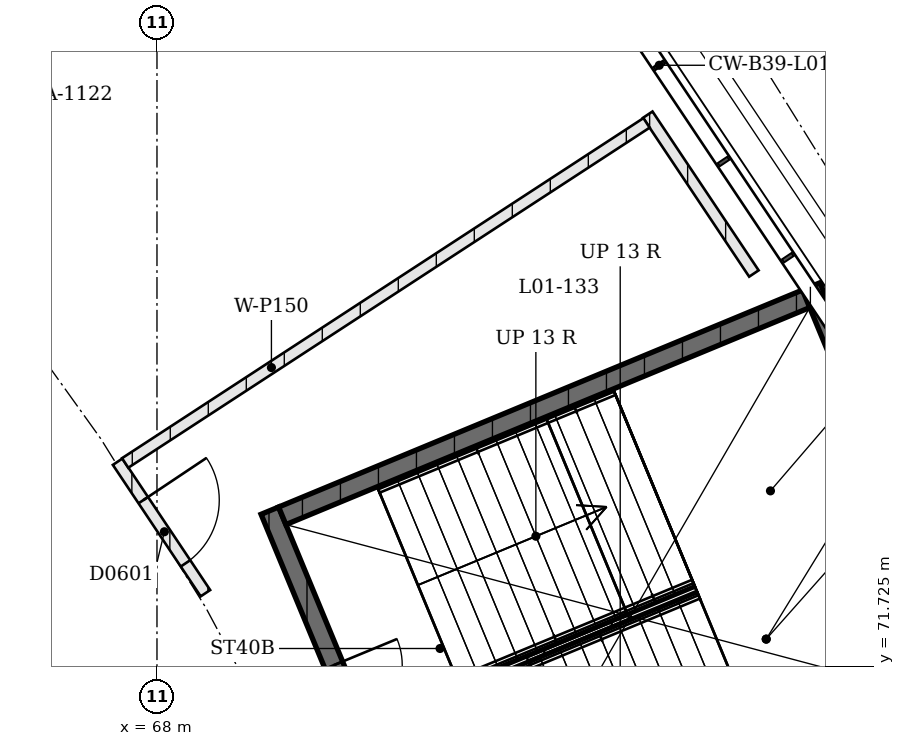
"""IFC4 building model, lengths in metres.
Left out: names, types, materials, properties, quantities, classifications, styles, units other than length and angle.
Written with IfcOpenShell. Run it as: python <this file> out.ifc"""

import sys

from ifc_helpers import new_model, si_unit, direction, frame, frame_2d, origin, place, context, subcontext, project, spatial, rectangle, extrude, element, fill, save


model = new_model("IFC4")
c1 = context("Model", 3, precision=1e-05, world=origin(), true_north=direction((0.0, 1.0)))
c2 = subcontext(c1, "Body", "Model", "MODEL_VIEW")
j1 = project(units=[si_unit("LENGTHUNIT", "METRE"), si_unit("PLANEANGLEUNIT", "RADIAN")], contexts=[c1])
p1 = place(None, origin())
s1 = spatial("IfcSite", under=j1, at=p1, CompositionType="ELEMENT")
p2 = place(p1, origin())
s2 = spatial("IfcBuilding", under=s1, at=p2, CompositionType="ELEMENT")
p3 = place(p2, frame((0.0, 0.0, 4.5)))
s3 = spatial("IfcBuildingStorey", under=s2, at=p3, CompositionType="ELEMENT", Elevation=4.5)
p4 = place(p3, frame((74.135, 62.549, 0.0), z_axis=(0.0, 0.0, 1.0), x_axis=(-0.382688386133, 0.923877480578, 0.0)))
e1 = element("IfcWall", 1, at=p4, inside=s3, PredefinedType="SHEAR", context=c2, shape_type="SweptSolid", body=[
    extrude(rectangle(XDim=12.15, YDim=0.25, at=frame_2d((6.075, 0.0))), origin(), (0.0, 0.0, 1.0), 4.09),
])
p5 = place(p4, frame((2.2, 0.0, 0.0)))
e2 = element("IfcOpeningElement", 2, at=p5, cuts=e1, PredefinedType="OPENING", context=c2, shape_type="SweptSolid", body=[
    extrude(rectangle(XDim=1.8, YDim=2.1, at=frame_2d((0.9, 1.05))), frame((0.0, 0.125, 0.0), z_axis=(0.0, -1.0, 0.0), x_axis=(1.0, 0.0, 0.0)), (0.0, 0.0, 1.0), 0.25),
])
p6 = place(p4, frame((8.15, 0.0, 0.0)))
e3 = element("IfcOpeningElement", 3, at=p6, cuts=e1, PredefinedType="OPENING", context=c2, shape_type="SweptSolid", body=[
    extrude(rectangle(XDim=1.8, YDim=2.1, at=frame_2d((0.9, 1.05))), frame((0.0, 0.125, 0.0), z_axis=(0.0, -1.0, 0.0), x_axis=(1.0, 0.0, 0.0)), (0.0, 0.0, 1.0), 0.25),
])
p7 = place(p3, frame((81.258, 65.499, 0.0), z_axis=(0.0, 0.0, 1.0), x_axis=(-0.382671234792, 0.923884584817, 0.0)))
e4 = element("IfcWall", 4, at=p7, inside=s3, PredefinedType="SHEAR", context=c2, shape_type="SweptSolid", body=[
    extrude(rectangle(XDim=12.15, YDim=0.25, at=frame_2d((6.075, 0.0))), origin(), (0.0, 0.0, 1.0), 4.09),
])
p8 = place(p3, frame((69.648, 73.706, 0.0), z_axis=(0.0, 0.0, 1.0), x_axis=(0.923887204407, 0.382664910245, 0.0)))
e5 = element("IfcWall", 5, at=p8, inside=s3, PredefinedType="SHEAR", context=c2, shape_type="SweptSolid", body=[
    extrude(rectangle(XDim=7.46, YDim=0.25, at=frame_2d((3.73, 0.0))), origin(), (0.0, 0.0, 1.0), 4.09),
])
p9 = place(p3, frame((68.638, 72.688, 0.0), z_axis=(0.0, 0.0, 1.0), x_axis=(-0.555620744921, 0.831435859109, 0.0)))
e6 = element("IfcWall", 6, at=p9, inside=s3, PredefinedType="PARTITIONING", context=c2, shape_type="SweptSolid", body=[
    extrude(rectangle(XDim=2.08, YDim=0.15, at=frame_2d((1.04, 0.0))), origin(), (0.0, 0.0, 1.0), 3.0),
])
p10 = place(p9, frame((0.472, 0.0, 0.0)))
e7 = element("IfcOpeningElement", 7, at=p10, cuts=e6, PredefinedType="OPENING", context=c2, shape_type="SweptSolid", body=[
    extrude(rectangle(XDim=1.0, YDim=2.1, at=frame_2d((0.5, 1.05))), frame((0.0, 0.075, 0.0), z_axis=(0.0, -1.0, 0.0), x_axis=(1.0, 0.0, 0.0)), (0.0, 0.0, 1.0), 0.15),
])
p11 = place(p3, frame((75.854, 76.894, 0.0), z_axis=(0.0, 0.0, 1.0), x_axis=(-0.555596479569, 0.83145207432, 0.0)))
e8 = element("IfcWall", 8, at=p11, inside=s3, PredefinedType="PARTITIONING", context=c2, shape_type="SweptSolid", body=[
    extrude(rectangle(XDim=2.513, YDim=0.15, at=frame_2d((1.257, 0.0))), origin(), (0.0, 0.0, 1.0), 3.0),
])
p12 = place(p3, frame((67.581, 74.402, 0.0), z_axis=(0.0, 0.0, 1.0), x_axis=(0.837607631618, 0.546272327191, 0.0)))
e9 = element("IfcWall", 9, at=p12, inside=s3, PredefinedType="PARTITIONING", context=c2, shape_type="SweptSolid", body=[
    extrude(rectangle(XDim=8.19, YDim=0.15, at=frame_2d((4.095, 0.0))), origin(), (0.0, 0.0, 1.0), 3.0),
])
p13 = place(p6, origin())
e10 = element("IfcDoor", 10, at=p13, inside=s3, OperationType="DOUBLE_DOOR_SINGLE_SWING", PredefinedType="DOOR", context=c2, shape_type="SweptSolid", body=[
    extrude(rectangle(XDim=1.8, YDim=2.1, at=frame_2d((0.9, 1.05))), frame((0.0, 0.025, 0.0), z_axis=(0.0, -1.0, 0.0), x_axis=(1.0, 0.0, 0.0)), (0.0, 0.0, 1.0), 0.05),
])
fill(e3, e10)
p14 = place(p10, origin())
e11 = element("IfcDoor", 11, at=p14, inside=s3, OperationType="SINGLE_SWING_RIGHT", PredefinedType="DOOR", context=c2, shape_type="SweptSolid", body=[
    extrude(rectangle(XDim=1.0, YDim=2.1, at=frame_2d((0.5, 1.05))), frame((0.0, 0.025, 0.0), z_axis=(0.0, -1.0, 0.0), x_axis=(1.0, 0.0, 0.0)), (0.0, 0.0, 1.0), 0.05),
])
fill(e7, e11)
save(model, sys.argv[1])
